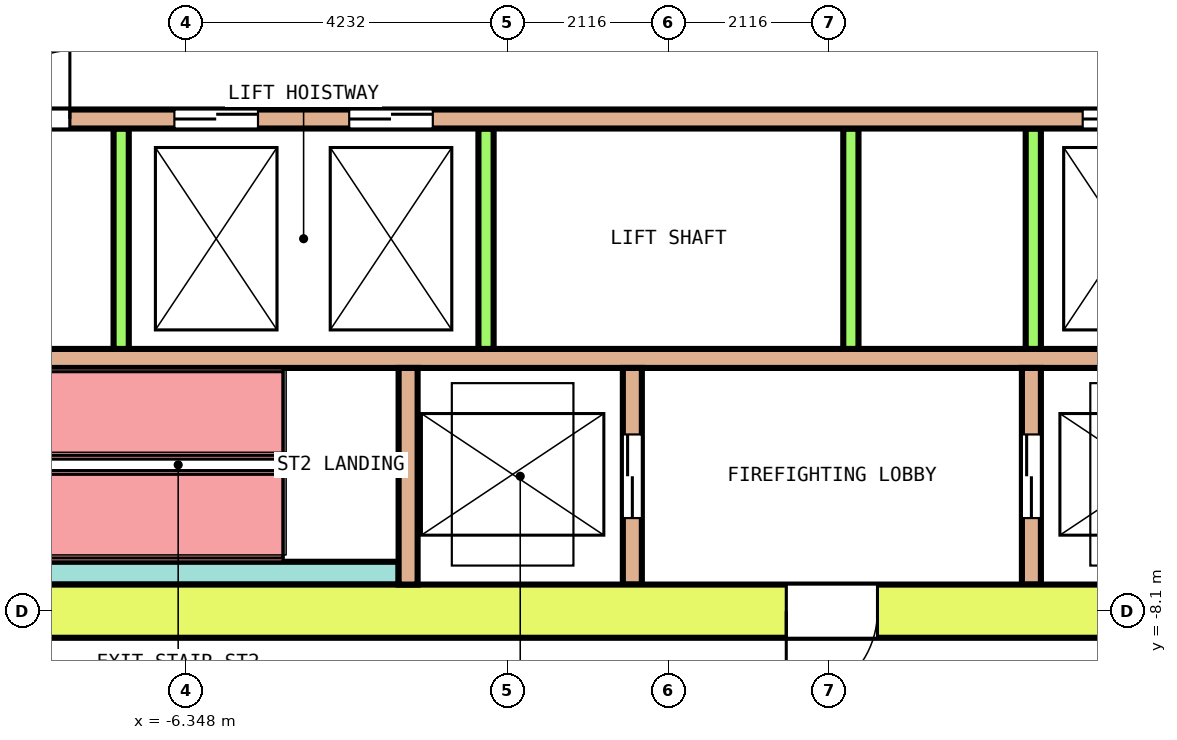
"""IFC4 building model, lengths in metres.
Left out: names, types, materials, properties, quantities, classifications, styles, units other than length and angle.
Written with IfcOpenShell. Run it as: python <this file> out.ifc"""

import sys

from ifc_helpers import new_model, si_unit, direction, frame, frame_2d, origin, place, context, subcontext, project, spatial, rectangle, extrude, element, fill, save


model = new_model("IFC4")
c1 = context("Model", 3, precision=1e-05, world=origin(), true_north=direction((0.0, 1.0)))
c2 = subcontext(c1, "Body", "Model", "MODEL_VIEW")
j1 = project(units=[si_unit("LENGTHUNIT", "METRE"), si_unit("PLANEANGLEUNIT", "RADIAN")], contexts=[c1])
p1 = place(None, origin())
s1 = spatial("IfcSite", under=j1, at=p1, CompositionType="ELEMENT")
p2 = place(p1, origin())
s2 = spatial("IfcBuilding", under=s1, at=p2, CompositionType="ELEMENT")
p3 = place(p2, frame((0.0, 0.0, 154.0)))
s3 = spatial("IfcBuildingStorey", under=s2, at=p3, CompositionType="ELEMENT", Elevation=154.0)
p4 = place(p3, frame((-13.55, -8.1, 0.0), z_axis=(0.0, 0.0, 1.0), x_axis=(1.0, 0.0, 0.0)))
e1 = element("IfcWall", 1, at=p4, inside=s3, PredefinedType="SHEAR", context=c2, shape_type="SweptSolid", body=[
    extrude(rectangle(XDim=27.1, YDim=0.7, at=frame_2d((13.55, 0.0))), origin(), (0.0, 0.0, 1.0), 4.1),
])
p5 = place(p4, frame((15.1, 0.0, 0.0)))
e2 = element("IfcOpeningElement", 2, at=p5, cuts=e1, PredefinedType="OPENING", context=c2, shape_type="SweptSolid", body=[
    extrude(rectangle(XDim=1.2, YDim=2.1, at=frame_2d((0.6, 1.05))), frame((0.0, 0.36, 0.0), z_axis=(0.0, -1.0, 0.0), x_axis=(1.0, 0.0, 0.0)), (0.0, 0.0, 1.0), 0.72),
])
p6 = place(p3, frame((-9.35, -1.625, 0.0), z_axis=(0.0, 0.0, 1.0), x_axis=(1.0, 0.0, 0.0)))
e3 = element("IfcWall", 3, at=p6, inside=s3, PredefinedType="SOLIDWALL", context=c2, shape_type="SweptSolid", body=[
    extrude(rectangle(XDim=18.7, YDim=0.25, at=frame_2d((9.35, 0.0))), origin(), (0.0, 0.0, 1.0), 4.1),
])
p7 = place(p6, frame((2.85, 0.0, 0.0)))
e4 = element("IfcOpeningElement", 4, at=p7, cuts=e3, PredefinedType="OPENING", context=c2, shape_type="SweptSolid", body=[
    extrude(rectangle(XDim=1.1, YDim=2.1, at=frame_2d((0.55, 1.05))), frame((0.0, 0.135, 0.0), z_axis=(0.0, -1.0, 0.0), x_axis=(1.0, 0.0, 0.0)), (0.0, 0.0, 1.0), 0.27),
])
p8 = place(p6, frame((5.15, 0.0, 0.0)))
e5 = element("IfcOpeningElement", 5, at=p8, cuts=e3, PredefinedType="OPENING", context=c2, shape_type="SweptSolid", body=[
    extrude(rectangle(XDim=1.1, YDim=2.1, at=frame_2d((0.55, 1.05))), frame((0.0, 0.135, 0.0), z_axis=(0.0, -1.0, 0.0), x_axis=(1.0, 0.0, 0.0)), (0.0, 0.0, 1.0), 0.27),
])
p9 = place(p6, frame((14.8, 0.0, 0.0)))
e6 = element("IfcOpeningElement", 6, at=p9, cuts=e3, PredefinedType="OPENING", context=c2, shape_type="SweptSolid", body=[
    extrude(rectangle(XDim=1.1, YDim=2.1, at=frame_2d((0.55, 1.05))), frame((0.0, 0.135, 0.0), z_axis=(0.0, -1.0, 0.0), x_axis=(1.0, 0.0, 0.0)), (0.0, 0.0, 1.0), 0.27),
])
p10 = place(p6, frame((0.575, 0.0, 0.0)))
e7 = element("IfcOpeningElement", 7, at=p10, cuts=e3, PredefinedType="OPENING", context=c2, shape_type="SweptSolid", body=[
    extrude(rectangle(XDim=0.9, YDim=2.1, at=frame_2d((0.45, 1.05))), frame((0.0, 0.135, 0.0), z_axis=(0.0, -1.0, 0.0), x_axis=(1.0, 0.0, 0.0)), (0.0, 0.0, 1.0), 0.27),
])
p11 = place(p6, frame((17.225, 0.0, 0.0)))
e8 = element("IfcOpeningElement", 8, at=p11, cuts=e3, PredefinedType="OPENING", context=c2, shape_type="SweptSolid", body=[
    extrude(rectangle(XDim=0.9, YDim=2.1, at=frame_2d((0.45, 1.05))), frame((0.0, 0.135, 0.0), z_axis=(0.0, -1.0, 0.0), x_axis=(1.0, 0.0, 0.0)), (0.0, 0.0, 1.0), 0.27),
])
p12 = place(p3, frame((-9.35, -4.775, 0.0), z_axis=(0.0, 0.0, 1.0), x_axis=(1.0, 0.0, 0.0)))
e9 = element("IfcWall", 9, at=p12, inside=s3, PredefinedType="SOLIDWALL", context=c2, shape_type="SweptSolid", body=[
    extrude(rectangle(XDim=18.7, YDim=0.25, at=frame_2d((9.35, 0.0))), origin(), (0.0, 0.0, 1.0), 4.1),
])
for number, where, z_axis, x_axis in (
    (10, (-7.2, -4.65, 0.0), (0.0, 0.0, 1.0), (0.0, 1.0, 0.0)),
    (11, (-2.4, -4.65, 0.0), (0.0, 0.0, 1.0), (0.0, 1.0, 0.0)),
    (12, (2.4, -4.65, 0.0), (0.0, 0.0, 1.0), (0.0, 1.0, 0.0)),
    (13, (4.8, -4.65, 0.0), (0.0, 0.0, 1.0), (0.0, 1.0, 0.0)),
):
    element("IfcWall", number, at=place(p3, frame(where, z_axis=z_axis, x_axis=x_axis)), inside=s3, PredefinedType="SOLIDWALL", context=c2, shape_type="SweptSolid", body=[
        extrude(rectangle(XDim=2.9, YDim=0.2, at=frame_2d((1.45, 0.0))), origin(), (0.0, 0.0, 1.0), 4.1),
    ])
p13 = place(p3, frame((-9.35, -7.6, 0.0), z_axis=(0.0, 0.0, 1.0), x_axis=(1.0, 0.0, 0.0)))
e14 = element("IfcWall", 14, at=p13, inside=s3, PredefinedType="SOLIDWALL", context=c2, shape_type="SweptSolid", body=[
    extrude(rectangle(XDim=5.8, YDim=0.3, at=frame_2d((2.9, 0.0))), origin(), (0.0, 0.0, 1.0), 4.1),
])
p14 = place(p3, frame((-3.425, -7.75, 0.0), z_axis=(0.0, 0.0, 1.0), x_axis=(0.0, 1.0, 0.0)))
e15 = element("IfcWall", 15, at=p14, inside=s3, PredefinedType="SOLIDWALL", context=c2, shape_type="SweptSolid", body=[
    extrude(rectangle(XDim=2.85, YDim=0.25, at=frame_2d((1.425, 0.0))), origin(), (0.0, 0.0, 1.0), 4.1),
])
p15 = place(p3, frame((-0.475, -7.75, 0.0), z_axis=(0.0, 0.0, 1.0), x_axis=(0.0, 1.0, 0.0)))
e16 = element("IfcWall", 16, at=p15, inside=s3, PredefinedType="SOLIDWALL", context=c2, shape_type="SweptSolid", body=[
    extrude(rectangle(XDim=2.85, YDim=0.25, at=frame_2d((1.425, 0.0))), origin(), (0.0, 0.0, 1.0), 4.1),
])
p16 = place(p15, frame((0.875, 0.0, 0.0)))
e17 = element("IfcOpeningElement", 17, at=p16, cuts=e16, PredefinedType="OPENING", context=c2, shape_type="SweptSolid", body=[
    extrude(rectangle(XDim=1.1, YDim=2.1, at=frame_2d((0.55, 1.05))), frame((0.0, 0.135, 0.0), z_axis=(0.0, -1.0, 0.0), x_axis=(1.0, 0.0, 0.0)), (0.0, 0.0, 1.0), 0.27),
])
p17 = place(p3, frame((4.775, -7.75, 0.0), z_axis=(0.0, 0.0, 1.0), x_axis=(0.0, 1.0, 0.0)))
e18 = element("IfcWall", 18, at=p17, inside=s3, PredefinedType="SOLIDWALL", context=c2, shape_type="SweptSolid", body=[
    extrude(rectangle(XDim=2.85, YDim=0.25, at=frame_2d((1.425, 0.0))), origin(), (0.0, 0.0, 1.0), 4.1),
])
p18 = place(p17, frame((0.875, 0.0, 0.0)))
e19 = element("IfcOpeningElement", 19, at=p18, cuts=e18, PredefinedType="OPENING", context=c2, shape_type="SweptSolid", body=[
    extrude(rectangle(XDim=1.1, YDim=2.1, at=frame_2d((0.55, 1.05))), frame((0.0, 0.135, 0.0), z_axis=(0.0, -1.0, 0.0), x_axis=(1.0, 0.0, 0.0)), (0.0, 0.0, 1.0), 0.27),
])
p19 = place(p7, origin())
e20 = element("IfcDoor", 20, at=p19, inside=s3, OperationType="DOUBLE_DOOR_SLIDING", PredefinedType="DOOR", context=c2, shape_type="SweptSolid", body=[
    extrude(rectangle(XDim=1.1, YDim=2.1, at=frame_2d((0.55, 1.05))), frame((0.0, 0.075, 0.0), z_axis=(0.0, -1.0, 0.0), x_axis=(1.0, 0.0, 0.0)), (0.0, 0.0, 1.0), 0.15),
])
fill(e4, e20)
p20 = place(p8, origin())
e21 = element("IfcDoor", 21, at=p20, inside=s3, OperationType="DOUBLE_DOOR_SLIDING", PredefinedType="DOOR", context=c2, shape_type="SweptSolid", body=[
    extrude(rectangle(XDim=1.1, YDim=2.1, at=frame_2d((0.55, 1.05))), frame((0.0, 0.075, 0.0), z_axis=(0.0, -1.0, 0.0), x_axis=(1.0, 0.0, 0.0)), (0.0, 0.0, 1.0), 0.15),
])
fill(e5, e21)
p21 = place(p9, origin())
e22 = element("IfcDoor", 22, at=p21, inside=s3, OperationType="DOUBLE_DOOR_SLIDING", PredefinedType="DOOR", context=c2, shape_type="SweptSolid", body=[
    extrude(rectangle(XDim=1.1, YDim=2.1, at=frame_2d((0.55, 1.05))), frame((0.0, 0.075, 0.0), z_axis=(0.0, -1.0, 0.0), x_axis=(1.0, 0.0, 0.0)), (0.0, 0.0, 1.0), 0.15),
])
fill(e6, e22)
p22 = place(p16, origin())
e23 = element("IfcDoor", 23, at=p22, inside=s3, OperationType="DOUBLE_DOOR_SLIDING", PredefinedType="DOOR", context=c2, shape_type="SweptSolid", body=[
    extrude(rectangle(XDim=1.1, YDim=2.1, at=frame_2d((0.55, 1.05))), frame((0.0, 0.075, 0.0), z_axis=(0.0, -1.0, 0.0), x_axis=(1.0, 0.0, 0.0)), (0.0, 0.0, 1.0), 0.15),
])
fill(e17, e23)
p23 = place(p18, origin())
e24 = element("IfcDoor", 24, at=p23, inside=s3, OperationType="DOUBLE_DOOR_SLIDING", PredefinedType="DOOR", context=c2, shape_type="SweptSolid", body=[
    extrude(rectangle(XDim=1.1, YDim=2.1, at=frame_2d((0.55, 1.05))), frame((0.0, 0.075, 0.0), z_axis=(0.0, -1.0, 0.0), x_axis=(1.0, 0.0, 0.0)), (0.0, 0.0, 1.0), 0.15),
])
fill(e19, e24)
p24 = place(p5, origin())
e25 = element("IfcDoor", 25, at=p24, inside=s3, OperationType="SINGLE_SWING_RIGHT", PredefinedType="DOOR", context=c2, shape_type="SweptSolid", body=[
    extrude(rectangle(XDim=1.2, YDim=2.1, at=frame_2d((0.6, 1.05))), frame((0.0, 0.3, 0.0), z_axis=(0.0, -1.0, 0.0), x_axis=(1.0, 0.0, 0.0)), (0.0, 0.0, 1.0), 0.6),
])
fill(e2, e25)
p25 = place(p10, origin())
e26 = element("IfcDoor", 26, at=p25, inside=s3, OperationType="SINGLE_SWING_RIGHT", PredefinedType="DOOR", context=c2, shape_type="SweptSolid", body=[
    extrude(rectangle(XDim=0.9, YDim=2.1, at=frame_2d((0.45, 1.05))), frame((0.0, 0.075, 0.0), z_axis=(0.0, -1.0, 0.0), x_axis=(1.0, 0.0, 0.0)), (0.0, 0.0, 1.0), 0.15),
])
fill(e7, e26)
save(model, sys.argv[1])
